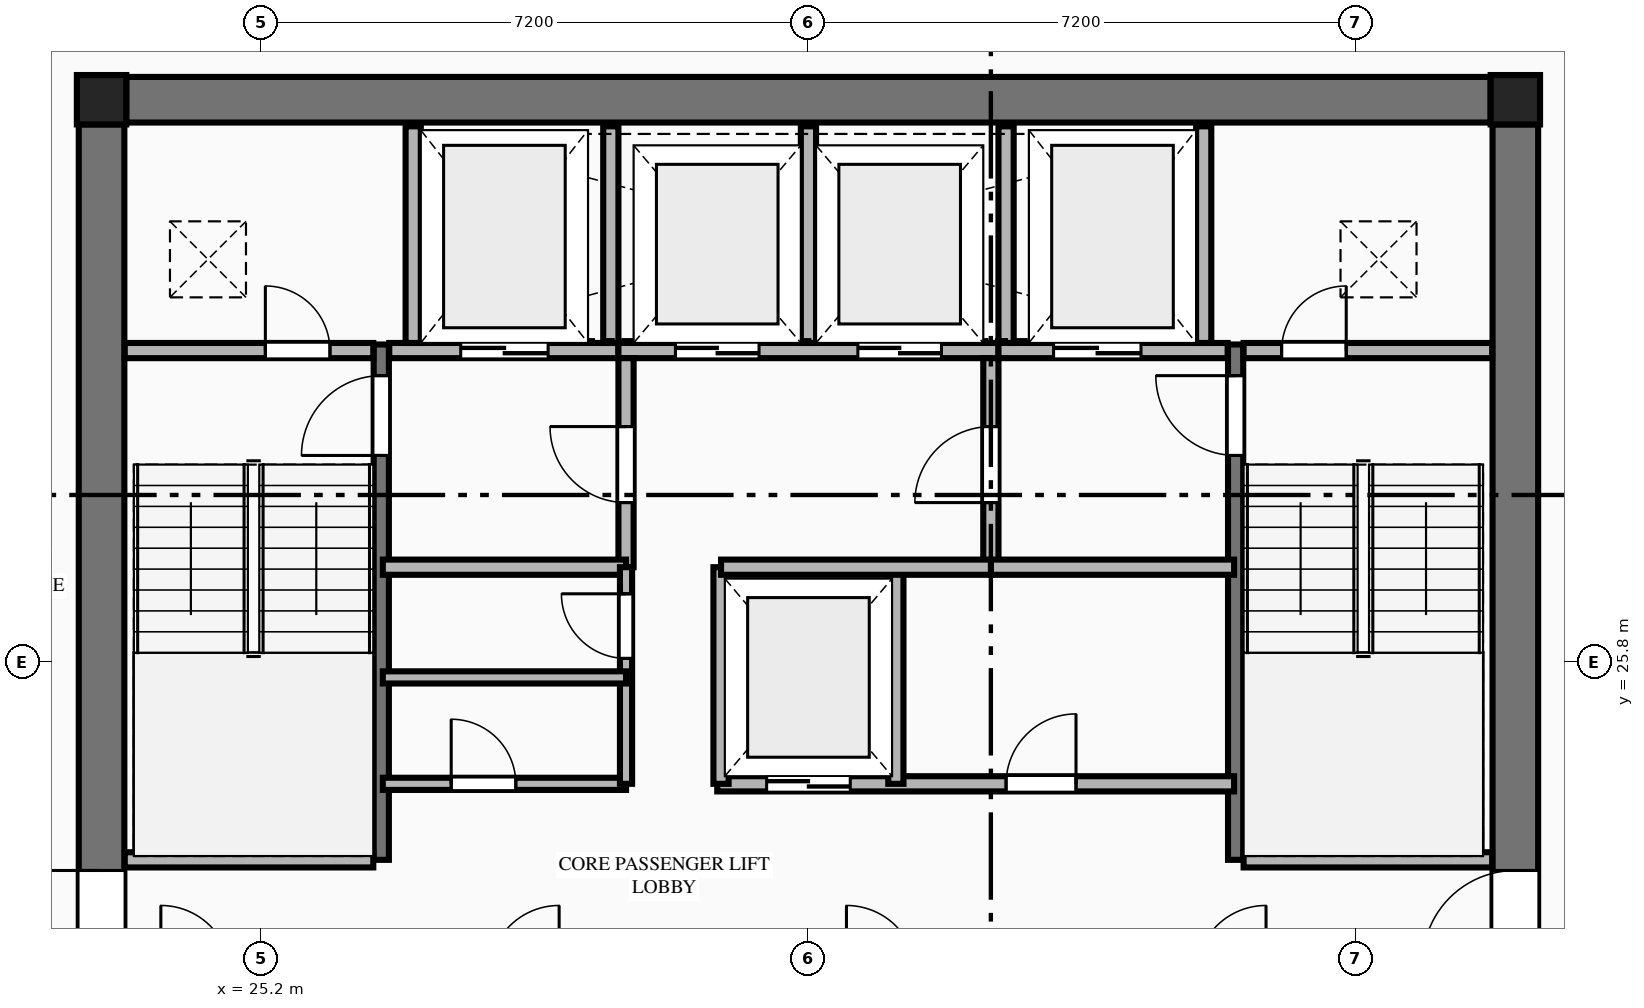
"""IFC4 building model, lengths in metres.
Left out: names, types, materials, properties, quantities, classifications, styles, units other than length and angle.
Written with IfcOpenShell. Run it as: python <this file> out.ifc"""

import sys

from ifc_helpers import new_model, si_unit, direction, frame, frame_2d, origin, origin_2d, place, context, subcontext, project, spatial, rectangle, extrude, element, fill, save


model = new_model("IFC4")
c1 = context("Model", 3, precision=1e-05, world=origin(), true_north=direction((0.0, 1.0)))
c2 = subcontext(c1, "Body", "Model", "MODEL_VIEW")
j1 = project(units=[si_unit("LENGTHUNIT", "METRE"), si_unit("PLANEANGLEUNIT", "RADIAN")], contexts=[c1])
p1 = place(None, origin())
s1 = spatial("IfcSite", under=j1, at=p1, CompositionType="ELEMENT")
p2 = place(p1, origin())
s2 = spatial("IfcBuilding", under=s1, at=p2, CompositionType="ELEMENT")
p3 = place(p2, frame((0.0, 0.0, 200.3)))
s3 = spatial("IfcBuildingStorey", under=s2, at=p3, CompositionType="ELEMENT", Elevation=200.3)
for number, where, z_axis, x_axis in (
    (1, (41.7, 33.2, 0.0), (0.0, 0.0, 1.0), (1.0, 0.0, 0.0)),
    (2, (23.1, 33.2, 0.0), (0.0, 0.0, 1.0), (1.0, 0.0, 0.0)),
):
    element("IfcColumn", number, at=place(p3, frame(where, z_axis=z_axis, x_axis=x_axis)), inside=s3, PredefinedType="COLUMN", context=c2, shape_type="SweptSolid", body=[
        extrude(rectangle(XDim=0.65, YDim=0.65, at=origin_2d()), origin(), (0.0, 0.0, 1.0), 3.55),
    ])
p4 = place(p3, frame((23.425, 33.2, 0.0), z_axis=(0.0, 0.0, 1.0), x_axis=(1.0, 0.0, 0.0)))
e3 = element("IfcWall", 3, at=p4, inside=s3, PredefinedType="SHEAR", context=c2, shape_type="SweptSolid", body=[
    extrude(rectangle(XDim=17.95, YDim=0.6, at=frame_2d((8.975, 0.0))), origin(), (0.0, 0.0, 1.0), 3.35),
])
p5 = place(p3, frame((23.1, 18.925, 0.0), z_axis=(0.0, 0.0, 1.0), x_axis=(0.0, 1.0, 0.0)))
e4 = element("IfcWall", 4, at=p5, inside=s3, PredefinedType="SHEAR", context=c2, shape_type="SweptSolid", body=[
    extrude(rectangle(XDim=13.95, YDim=0.6, at=frame_2d((6.975, 0.0))), origin(), (0.0, 0.0, 1.0), 3.35),
])
p6 = place(p5, frame((2.915, 0.0, 0.0)))
e5 = element("IfcOpeningElement", 5, at=p6, cuts=e4, PredefinedType="OPENING", context=c2, shape_type="SweptSolid", body=[
    extrude(rectangle(XDim=1.22, YDim=2.25, at=frame_2d((0.61, 1.125))), frame((0.0, 0.31, 0.0), z_axis=(0.0, -1.0, 0.0), x_axis=(1.0, 0.0, 0.0)), (0.0, 0.0, 1.0), 0.62),
])
p7 = place(p3, frame((41.7, 18.925, 0.0), z_axis=(0.0, 0.0, 1.0), x_axis=(0.0, 1.0, 0.0)))
e6 = element("IfcWall", 6, at=p7, inside=s3, PredefinedType="SHEAR", context=c2, shape_type="SweptSolid", body=[
    extrude(rectangle(XDim=13.95, YDim=0.6, at=frame_2d((6.975, 0.0))), origin(), (0.0, 0.0, 1.0), 3.35),
])
p8 = place(p7, frame((2.915, 0.0, 0.0)))
e7 = element("IfcOpeningElement", 7, at=p8, cuts=e6, PredefinedType="OPENING", context=c2, shape_type="SweptSolid", body=[
    extrude(rectangle(XDim=1.22, YDim=2.25, at=frame_2d((0.61, 1.125))), frame((0.0, 0.31, 0.0), z_axis=(0.0, -1.0, 0.0), x_axis=(1.0, 0.0, 0.0)), (0.0, 0.0, 1.0), 0.62),
])
p9 = place(p3, frame((26.78, 23.2, 0.0), z_axis=(0.0, 0.0, 1.0), x_axis=(0.0, 1.0, 0.0)))
e8 = element("IfcWall", 8, at=p9, inside=s3, PredefinedType="SHEAR", context=c2, shape_type="SweptSolid", body=[
    extrude(rectangle(XDim=6.78, YDim=0.2, at=frame_2d((3.39, 0.0))), origin(), (0.0, 0.0, 1.0), 3.55),
])
p10 = place(p9, frame((5.32, 0.0, 0.0)))
e9 = element("IfcOpeningElement", 9, at=p10, cuts=e8, PredefinedType="OPENING", context=c2, shape_type="SweptSolid", body=[
    extrude(rectangle(XDim=1.05, YDim=2.15, at=frame_2d((0.525, 1.075))), frame((0.0, 0.11, 0.0), z_axis=(0.0, -1.0, 0.0), x_axis=(1.0, 0.0, 0.0)), (0.0, 0.0, 1.0), 0.22),
])
p11 = place(p3, frame((23.405, 23.2, 0.0), z_axis=(0.0, 0.0, 1.0), x_axis=(1.0, 0.0, 0.0)))
e10 = element("IfcWall", 10, at=p11, inside=s3, PredefinedType="PLUMBINGWALL", context=c2, shape_type="SweptSolid", body=[
    extrude(rectangle(XDim=3.27, YDim=0.2, at=frame_2d((1.635, 0.0))), origin(), (0.0, 0.0, 1.0), 3.35),
])
p12 = place(p3, frame((38.02, 23.2, 0.0), z_axis=(0.0, 0.0, 1.0), x_axis=(0.0, 1.0, 0.0)))
e11 = element("IfcWall", 11, at=p12, inside=s3, PredefinedType="SHEAR", context=c2, shape_type="SweptSolid", body=[
    extrude(rectangle(XDim=6.78, YDim=0.2, at=frame_2d((3.39, 0.0))), origin(), (0.0, 0.0, 1.0), 3.55),
])
p13 = place(p12, frame((5.32, 0.0, 0.0)))
e12 = element("IfcOpeningElement", 12, at=p13, cuts=e11, PredefinedType="OPENING", context=c2, shape_type="SweptSolid", body=[
    extrude(rectangle(XDim=1.05, YDim=2.15, at=frame_2d((0.525, 1.075))), frame((0.0, 0.11, 0.0), z_axis=(0.0, -1.0, 0.0), x_axis=(1.0, 0.0, 0.0)), (0.0, 0.0, 1.0), 0.22),
])
p14 = place(p3, frame((38.125, 23.2, 0.0), z_axis=(0.0, 0.0, 1.0), x_axis=(1.0, 0.0, 0.0)))
e13 = element("IfcWall", 13, at=p14, inside=s3, PredefinedType="PLUMBINGWALL", context=c2, shape_type="SweptSolid", body=[
    extrude(rectangle(XDim=3.27, YDim=0.2, at=frame_2d((1.635, 0.0))), origin(), (0.0, 0.0, 1.0), 3.35),
])
p15 = place(p3, frame((23.405, 29.9, 0.0), z_axis=(0.0, 0.0, 1.0), x_axis=(1.0, 0.0, 0.0)))
e14 = element("IfcWall", 14, at=p15, inside=s3, PredefinedType="PLUMBINGWALL", context=c2, shape_type="SweptSolid", body=[
    extrude(rectangle(XDim=3.27, YDim=0.2, at=frame_2d((1.635, 0.0))), origin(), (0.0, 0.0, 1.0), 3.35),
])
p16 = place(p15, frame((1.85, 0.0, 0.0)))
e15 = element("IfcOpeningElement", 15, at=p16, cuts=e14, PredefinedType="OPENING", context=c2, shape_type="SweptSolid", body=[
    extrude(rectangle(XDim=0.85, YDim=2.05, at=frame_2d((0.425, 1.025))), frame((0.0, 0.11, 0.0), z_axis=(0.0, -1.0, 0.0), x_axis=(1.0, 0.0, 0.0)), (0.0, 0.0, 1.0), 0.22),
])
p17 = place(p3, frame((26.885, 29.9, 0.0), z_axis=(0.0, 0.0, 1.0), x_axis=(1.0, 0.0, 0.0)))
e16 = element("IfcWall", 16, at=p17, inside=s3, PredefinedType="PLUMBINGWALL", context=c2, shape_type="SweptSolid", body=[
    extrude(rectangle(XDim=3.015, YDim=0.2, at=frame_2d((1.507, 0.0))), origin(), (0.0, 0.0, 1.0), 3.35),
])
p18 = place(p17, frame((0.94, 0.0, 0.0)))
e17 = element("IfcOpeningElement", 17, at=p18, cuts=e16, PredefinedType="OPENING", context=c2, shape_type="SweptSolid", body=[
    extrude(rectangle(XDim=1.15, YDim=2.2, at=frame_2d((0.575, 1.1))), frame((0.0, 0.11, 0.0), z_axis=(0.0, -1.0, 0.0), x_axis=(1.0, 0.0, 0.0)), (0.0, 0.0, 1.0), 0.22),
])
p19 = place(p3, frame((29.9, 29.9, 0.0), z_axis=(0.0, 0.0, 1.0), x_axis=(1.0, 0.0, 0.0)))
e18 = element("IfcWall", 18, at=p19, inside=s3, PredefinedType="PLUMBINGWALL", context=c2, shape_type="SweptSolid", body=[
    extrude(rectangle(XDim=5.0, YDim=0.2, at=frame_2d((2.5, 0.0))), origin(), (0.0, 0.0, 1.0), 3.35),
])
p20 = place(p19, frame((0.75, 0.0, 0.0)))
e19 = element("IfcOpeningElement", 19, at=p20, cuts=e18, PredefinedType="OPENING", context=c2, shape_type="SweptSolid", body=[
    extrude(rectangle(XDim=1.1, YDim=2.2, at=frame_2d((0.55, 1.1))), frame((0.0, 0.11, 0.0), z_axis=(0.0, -1.0, 0.0), x_axis=(1.0, 0.0, 0.0)), (0.0, 0.0, 1.0), 0.22),
])
p21 = place(p19, frame((3.15, 0.0, 0.0)))
e20 = element("IfcOpeningElement", 20, at=p21, cuts=e18, PredefinedType="OPENING", context=c2, shape_type="SweptSolid", body=[
    extrude(rectangle(XDim=1.1, YDim=2.2, at=frame_2d((0.55, 1.1))), frame((0.0, 0.11, 0.0), z_axis=(0.0, -1.0, 0.0), x_axis=(1.0, 0.0, 0.0)), (0.0, 0.0, 1.0), 0.22),
])
p22 = place(p3, frame((34.9, 29.9, 0.0), z_axis=(0.0, 0.0, 1.0), x_axis=(1.0, 0.0, 0.0)))
e21 = element("IfcWall", 21, at=p22, inside=s3, PredefinedType="PLUMBINGWALL", context=c2, shape_type="SweptSolid", body=[
    extrude(rectangle(XDim=3.015, YDim=0.2, at=frame_2d((1.508, 0.0))), origin(), (0.0, 0.0, 1.0), 3.35),
])
p23 = place(p22, frame((0.725, 0.0, 0.0)))
e22 = element("IfcOpeningElement", 22, at=p23, cuts=e21, PredefinedType="OPENING", context=c2, shape_type="SweptSolid", body=[
    extrude(rectangle(XDim=1.15, YDim=2.2, at=frame_2d((0.575, 1.1))), frame((0.0, 0.11, 0.0), z_axis=(0.0, -1.0, 0.0), x_axis=(1.0, 0.0, 0.0)), (0.0, 0.0, 1.0), 0.22),
])
p24 = place(p3, frame((38.125, 29.9, 0.0), z_axis=(0.0, 0.0, 1.0), x_axis=(1.0, 0.0, 0.0)))
e23 = element("IfcWall", 23, at=p24, inside=s3, PredefinedType="PLUMBINGWALL", context=c2, shape_type="SweptSolid", body=[
    extrude(rectangle(XDim=3.27, YDim=0.2, at=frame_2d((1.635, 0.0))), origin(), (0.0, 0.0, 1.0), 3.35),
])
p25 = place(p24, frame((0.5, 0.0, 0.0)))
e24 = element("IfcOpeningElement", 24, at=p25, cuts=e23, PredefinedType="OPENING", context=c2, shape_type="SweptSolid", body=[
    extrude(rectangle(XDim=0.85, YDim=2.05, at=frame_2d((0.425, 1.025))), frame((0.0, 0.11, 0.0), z_axis=(0.0, -1.0, 0.0), x_axis=(1.0, 0.0, 0.0)), (0.0, 0.0, 1.0), 0.22),
])
for number, where, z_axis, x_axis in (
    (25, (27.2, 30.0, 0.0), (0.0, 0.0, 1.0), (0.0, 1.0, 0.0)),
    (26, (29.8, 30.0, 0.0), (0.0, 0.0, 1.0), (0.0, 1.0, 0.0)),
    (27, (32.4, 30.0, 0.0), (0.0, 0.0, 1.0), (0.0, 1.0, 0.0)),
    (28, (35.0, 30.0, 0.0), (0.0, 0.0, 1.0), (0.0, 1.0, 0.0)),
    (29, (37.6, 30.0, 0.0), (0.0, 0.0, 1.0), (0.0, 1.0, 0.0)),
):
    element("IfcWall", number, at=place(p3, frame(where, z_axis=z_axis, x_axis=x_axis)), inside=s3, PredefinedType="PLUMBINGWALL", context=c2, shape_type="SweptSolid", body=[
        extrude(rectangle(XDim=2.85, YDim=0.2, at=frame_2d((1.425, 0.0))), origin(), (0.0, 0.0, 1.0), 3.35),
    ])
p26 = place(p3, frame((30.0, 27.05, 0.0), z_axis=(0.0, 0.0, 1.0), x_axis=(0.0, 1.0, 0.0)))
e30 = element("IfcWall", 30, at=p26, inside=s3, PredefinedType="PLUMBINGWALL", context=c2, shape_type="SweptSolid", body=[
    extrude(rectangle(XDim=2.75, YDim=0.2, at=frame_2d((1.375, 0.0))), origin(), (0.0, 0.0, 1.0), 3.35),
])
p27 = place(p26, frame((0.85, 0.0, 0.0)))
e31 = element("IfcOpeningElement", 31, at=p27, cuts=e30, PredefinedType="OPENING", context=c2, shape_type="SweptSolid", body=[
    extrude(rectangle(XDim=1.0, YDim=2.15, at=frame_2d((0.5, 1.075))), frame((0.0, 0.11, 0.0), z_axis=(0.0, -1.0, 0.0), x_axis=(1.0, 0.0, 0.0)), (0.0, 0.0, 1.0), 0.22),
])
p28 = place(p3, frame((26.8, 27.05, 0.0), z_axis=(0.0, 0.0, 1.0), x_axis=(1.0, 0.0, 0.0)))
e32 = element("IfcWall", 32, at=p28, inside=s3, PredefinedType="PLUMBINGWALL", context=c2, shape_type="SweptSolid", body=[
    extrude(rectangle(XDim=3.2, YDim=0.2, at=frame_2d((1.6, 0.0))), origin(), (0.0, 0.0, 1.0), 3.35),
])
p29 = place(p3, frame((34.8, 27.05, 0.0), z_axis=(0.0, 0.0, 1.0), x_axis=(0.0, 1.0, 0.0)))
e33 = element("IfcWall", 33, at=p29, inside=s3, PredefinedType="PLUMBINGWALL", context=c2, shape_type="SweptSolid", body=[
    extrude(rectangle(XDim=2.75, YDim=0.2, at=frame_2d((1.375, 0.0))), origin(), (0.0, 0.0, 1.0), 3.35),
])
p30 = place(p29, frame((0.85, 0.0, 0.0)))
e34 = element("IfcOpeningElement", 34, at=p30, cuts=e33, PredefinedType="OPENING", context=c2, shape_type="SweptSolid", body=[
    extrude(rectangle(XDim=1.0, YDim=2.15, at=frame_2d((0.5, 1.075))), frame((0.0, 0.11, 0.0), z_axis=(0.0, -1.0, 0.0), x_axis=(1.0, 0.0, 0.0)), (0.0, 0.0, 1.0), 0.22),
])
p31 = place(p3, frame((34.8, 27.05, 0.0), z_axis=(0.0, 0.0, 1.0), x_axis=(1.0, 0.0, 0.0)))
e35 = element("IfcWall", 35, at=p31, inside=s3, PredefinedType="PLUMBINGWALL", context=c2, shape_type="SweptSolid", body=[
    extrude(rectangle(XDim=3.2, YDim=0.2, at=frame_2d((1.6, 0.0))), origin(), (0.0, 0.0, 1.0), 3.35),
])
p32 = place(p3, frame((26.8, 24.2, 0.0), z_axis=(0.0, 0.0, 1.0), x_axis=(1.0, 0.0, 0.0)))
e36 = element("IfcWall", 36, at=p32, inside=s3, PredefinedType="PARTITIONING", context=c2, shape_type="SweptSolid", body=[
    extrude(rectangle(XDim=3.2, YDim=0.16, at=frame_2d((1.6, 0.0))), origin(), (0.0, 0.0, 1.0), 3.35),
])
p33 = place(p32, frame((0.9, 0.0, 0.0)))
e37 = element("IfcOpeningElement", 37, at=p33, cuts=e36, PredefinedType="OPENING", context=c2, shape_type="SweptSolid", body=[
    extrude(rectangle(XDim=0.85, YDim=2.05, at=frame_2d((0.425, 1.025))), frame((0.0, 0.09, 0.0), z_axis=(0.0, -1.0, 0.0), x_axis=(1.0, 0.0, 0.0)), (0.0, 0.0, 1.0), 0.18),
])
p34 = place(p3, frame((30.0, 24.2, 0.0), z_axis=(0.0, 0.0, 1.0), x_axis=(0.0, 1.0, 0.0)))
e38 = element("IfcWall", 38, at=p34, inside=s3, PredefinedType="PARTITIONING", context=c2, shape_type="SweptSolid", body=[
    extrude(rectangle(XDim=2.85, YDim=0.16, at=frame_2d((1.425, 0.0))), origin(), (0.0, 0.0, 1.0), 3.35),
])
p35 = place(p34, frame((1.65, 0.0, 0.0)))
e39 = element("IfcOpeningElement", 39, at=p35, cuts=e38, PredefinedType="OPENING", context=c2, shape_type="SweptSolid", body=[
    extrude(rectangle(XDim=0.85, YDim=2.05, at=frame_2d((0.425, 1.025))), frame((0.0, 0.09, 0.0), z_axis=(0.0, -1.0, 0.0), x_axis=(1.0, 0.0, 0.0)), (0.0, 0.0, 1.0), 0.18),
])
p36 = place(p3, frame((31.2, 24.2, 0.0), z_axis=(0.0, 0.0, 1.0), x_axis=(1.0, 0.0, 0.0)))
e40 = element("IfcWall", 40, at=p36, inside=s3, PredefinedType="PLUMBINGWALL", context=c2, shape_type="SweptSolid", body=[
    extrude(rectangle(XDim=6.8, YDim=0.2, at=frame_2d((3.4, 0.0))), origin(), (0.0, 0.0, 1.0), 3.35),
])
p37 = place(p36, frame((0.65, 0.0, 0.0)))
e41 = element("IfcOpeningElement", 41, at=p37, cuts=e40, PredefinedType="OPENING", context=c2, shape_type="SweptSolid", body=[
    extrude(rectangle(XDim=1.1, YDim=2.2, at=frame_2d((0.55, 1.1))), frame((0.0, 0.11, 0.0), z_axis=(0.0, -1.0, 0.0), x_axis=(1.0, 0.0, 0.0)), (0.0, 0.0, 1.0), 0.22),
])
p38 = place(p36, frame((3.8, 0.0, 0.0)))
e42 = element("IfcOpeningElement", 42, at=p38, cuts=e40, PredefinedType="OPENING", context=c2, shape_type="SweptSolid", body=[
    extrude(rectangle(XDim=0.92, YDim=2.15, at=frame_2d((0.46, 1.075))), frame((0.0, 0.11, 0.0), z_axis=(0.0, -1.0, 0.0), x_axis=(1.0, 0.0, 0.0)), (0.0, 0.0, 1.0), 0.22),
])
for number, where, z_axis, x_axis in (
    (43, (31.25, 24.2, 0.0), (0.0, 0.0, 1.0), (0.0, 1.0, 0.0)),
    (44, (33.55, 24.2, 0.0), (0.0, 0.0, 1.0), (0.0, 1.0, 0.0)),
):
    element("IfcWall", number, at=place(p3, frame(where, z_axis=z_axis, x_axis=x_axis)), inside=s3, PredefinedType="PLUMBINGWALL", context=c2, shape_type="SweptSolid", body=[
        extrude(rectangle(XDim=2.85, YDim=0.2, at=frame_2d((1.425, 0.0))), origin(), (0.0, 0.0, 1.0), 3.35),
    ])
p39 = place(p3, frame((31.25, 27.05, 0.0), z_axis=(0.0, 0.0, 1.0), x_axis=(1.0, 0.0, 0.0)))
e45 = element("IfcWall", 45, at=p39, inside=s3, PredefinedType="PLUMBINGWALL", context=c2, shape_type="SweptSolid", body=[
    extrude(rectangle(XDim=3.55, YDim=0.2, at=frame_2d((1.775, 0.0))), origin(), (0.0, 0.0, 1.0), 3.35),
])
p40 = place(p3, frame((26.8, 25.6, 0.0), z_axis=(0.0, 0.0, 1.0), x_axis=(1.0, 0.0, 0.0)))
e46 = element("IfcWall", 46, at=p40, inside=s3, PredefinedType="PARTITIONING", context=c2, shape_type="SweptSolid", body=[
    extrude(rectangle(XDim=3.2, YDim=0.16, at=frame_2d((1.6, 0.0))), origin(), (0.0, 0.0, 1.0), 3.35),
])
p41 = place(p6, origin())
e47 = element("IfcDoor", 47, at=p41, inside=s3, OperationType="SINGLE_SWING_RIGHT", PredefinedType="DOOR", context=c2, shape_type="SweptSolid", body=[
    extrude(rectangle(XDim=1.22, YDim=2.25, at=frame_2d((0.61, 1.125))), frame((0.0, 0.025, 0.0), z_axis=(0.0, -1.0, 0.0), x_axis=(1.0, 0.0, 0.0)), (0.0, 0.0, 1.0), 0.05),
])
fill(e5, e47)
p42 = place(p8, origin())
e48 = element("IfcDoor", 48, at=p42, inside=s3, OperationType="SINGLE_SWING_LEFT", PredefinedType="DOOR", context=c2, shape_type="SweptSolid", body=[
    extrude(rectangle(XDim=1.22, YDim=2.25, at=frame_2d((0.61, 1.125))), frame((0.0, 0.025, 0.0), z_axis=(0.0, -1.0, 0.0), x_axis=(1.0, 0.0, 0.0)), (0.0, 0.0, 1.0), 0.05),
])
fill(e7, e48)
p43 = place(p10, origin())
e49 = element("IfcDoor", 49, at=p43, inside=s3, OperationType="SINGLE_SWING_LEFT", PredefinedType="DOOR", context=c2, shape_type="SweptSolid", body=[
    extrude(rectangle(XDim=1.05, YDim=2.15, at=frame_2d((0.525, 1.075))), frame((0.0, 0.025, 0.0), z_axis=(0.0, -1.0, 0.0), x_axis=(1.0, 0.0, 0.0)), (0.0, 0.0, 1.0), 0.05),
])
fill(e9, e49)
p44 = place(p13, origin())
e50 = element("IfcDoor", 50, at=p44, inside=s3, OperationType="SINGLE_SWING_RIGHT", PredefinedType="DOOR", context=c2, shape_type="SweptSolid", body=[
    extrude(rectangle(XDim=1.05, YDim=2.15, at=frame_2d((0.525, 1.075))), frame((0.0, 0.025, 0.0), z_axis=(0.0, -1.0, 0.0), x_axis=(1.0, 0.0, 0.0)), (0.0, 0.0, 1.0), 0.05),
])
fill(e12, e50)
p45 = place(p16, origin())
e51 = element("IfcDoor", 51, at=p45, inside=s3, OperationType="SINGLE_SWING_LEFT", PredefinedType="DOOR", context=c2, shape_type="SweptSolid", body=[
    extrude(rectangle(XDim=0.85, YDim=2.05, at=frame_2d((0.425, 1.025))), frame((0.0, 0.025, 0.0), z_axis=(0.0, -1.0, 0.0), x_axis=(1.0, 0.0, 0.0)), (0.0, 0.0, 1.0), 0.05),
])
fill(e15, e51)
p46 = place(p25, origin())
e52 = element("IfcDoor", 52, at=p46, inside=s3, OperationType="SINGLE_SWING_RIGHT", PredefinedType="DOOR", context=c2, shape_type="SweptSolid", body=[
    extrude(rectangle(XDim=0.85, YDim=2.05, at=frame_2d((0.425, 1.025))), frame((0.0, 0.025, 0.0), z_axis=(0.0, -1.0, 0.0), x_axis=(1.0, 0.0, 0.0)), (0.0, 0.0, 1.0), 0.05),
])
fill(e24, e52)
p47 = place(p18, origin())
e53 = element("IfcDoor", 53, at=p47, inside=s3, OperationType="DOUBLE_DOOR_SLIDING", PredefinedType="DOOR", context=c2, shape_type="SweptSolid", body=[
    extrude(rectangle(XDim=1.15, YDim=2.2, at=frame_2d((0.575, 1.1))), frame((0.0, 0.025, 0.0), z_axis=(0.0, -1.0, 0.0), x_axis=(1.0, 0.0, 0.0)), (0.0, 0.0, 1.0), 0.05),
])
fill(e17, e53)
p48 = place(p23, origin())
e54 = element("IfcDoor", 54, at=p48, inside=s3, OperationType="DOUBLE_DOOR_SLIDING", PredefinedType="DOOR", context=c2, shape_type="SweptSolid", body=[
    extrude(rectangle(XDim=1.15, YDim=2.2, at=frame_2d((0.575, 1.1))), frame((0.0, 0.025, 0.0), z_axis=(0.0, -1.0, 0.0), x_axis=(1.0, 0.0, 0.0)), (0.0, 0.0, 1.0), 0.05),
])
fill(e22, e54)
p49 = place(p20, origin())
e55 = element("IfcDoor", 55, at=p49, inside=s3, OperationType="DOUBLE_DOOR_SLIDING", PredefinedType="DOOR", context=c2, shape_type="SweptSolid", body=[
    extrude(rectangle(XDim=1.1, YDim=2.2, at=frame_2d((0.55, 1.1))), frame((0.0, 0.025, 0.0), z_axis=(0.0, -1.0, 0.0), x_axis=(1.0, 0.0, 0.0)), (0.0, 0.0, 1.0), 0.05),
])
fill(e19, e55)
p50 = place(p21, origin())
e56 = element("IfcDoor", 56, at=p50, inside=s3, OperationType="DOUBLE_DOOR_SLIDING", PredefinedType="DOOR", context=c2, shape_type="SweptSolid", body=[
    extrude(rectangle(XDim=1.1, YDim=2.2, at=frame_2d((0.55, 1.1))), frame((0.0, 0.025, 0.0), z_axis=(0.0, -1.0, 0.0), x_axis=(1.0, 0.0, 0.0)), (0.0, 0.0, 1.0), 0.05),
])
fill(e20, e56)
p51 = place(p27, origin())
e57 = element("IfcDoor", 57, at=p51, inside=s3, OperationType="SINGLE_SWING_RIGHT", PredefinedType="DOOR", context=c2, shape_type="SweptSolid", body=[
    extrude(rectangle(XDim=1.0, YDim=2.15, at=frame_2d((0.5, 1.075))), frame((0.0, 0.025, 0.0), z_axis=(0.0, -1.0, 0.0), x_axis=(1.0, 0.0, 0.0)), (0.0, 0.0, 1.0), 0.05),
])
fill(e31, e57)
p52 = place(p30, origin())
e58 = element("IfcDoor", 58, at=p52, inside=s3, OperationType="SINGLE_SWING_LEFT", PredefinedType="DOOR", context=c2, shape_type="SweptSolid", body=[
    extrude(rectangle(XDim=1.0, YDim=2.15, at=frame_2d((0.5, 1.075))), frame((0.0, 0.025, 0.0), z_axis=(0.0, -1.0, 0.0), x_axis=(1.0, 0.0, 0.0)), (0.0, 0.0, 1.0), 0.05),
])
fill(e34, e58)
p53 = place(p37, origin())
e59 = element("IfcDoor", 59, at=p53, inside=s3, OperationType="DOUBLE_DOOR_SLIDING", PredefinedType="DOOR", context=c2, shape_type="SweptSolid", body=[
    extrude(rectangle(XDim=1.1, YDim=2.2, at=frame_2d((0.55, 1.1))), frame((0.0, 0.025, 0.0), z_axis=(0.0, -1.0, 0.0), x_axis=(1.0, 0.0, 0.0)), (0.0, 0.0, 1.0), 0.05),
])
fill(e41, e59)
p54 = place(p33, origin())
e60 = element("IfcDoor", 60, at=p54, inside=s3, OperationType="SINGLE_SWING_LEFT", PredefinedType="DOOR", context=c2, shape_type="SweptSolid", body=[
    extrude(rectangle(XDim=0.85, YDim=2.05, at=frame_2d((0.425, 1.025))), frame((0.0, 0.025, 0.0), z_axis=(0.0, -1.0, 0.0), x_axis=(1.0, 0.0, 0.0)), (0.0, 0.0, 1.0), 0.05),
])
fill(e37, e60)
p55 = place(p35, origin())
e61 = element("IfcDoor", 61, at=p55, inside=s3, OperationType="SINGLE_SWING_RIGHT", PredefinedType="DOOR", context=c2, shape_type="SweptSolid", body=[
    extrude(rectangle(XDim=0.85, YDim=2.05, at=frame_2d((0.425, 1.025))), frame((0.0, 0.025, 0.0), z_axis=(0.0, -1.0, 0.0), x_axis=(1.0, 0.0, 0.0)), (0.0, 0.0, 1.0), 0.05),
])
fill(e39, e61)
p56 = place(p38, origin())
e62 = element("IfcDoor", 62, at=p56, inside=s3, OperationType="SINGLE_SWING_RIGHT", PredefinedType="DOOR", context=c2, shape_type="SweptSolid", body=[
    extrude(rectangle(XDim=0.92, YDim=2.15, at=frame_2d((0.46, 1.075))), frame((0.0, 0.025, 0.0), z_axis=(0.0, -1.0, 0.0), x_axis=(1.0, 0.0, 0.0)), (0.0, 0.0, 1.0), 0.05),
])
fill(e42, e62)
save(model, sys.argv[1])
